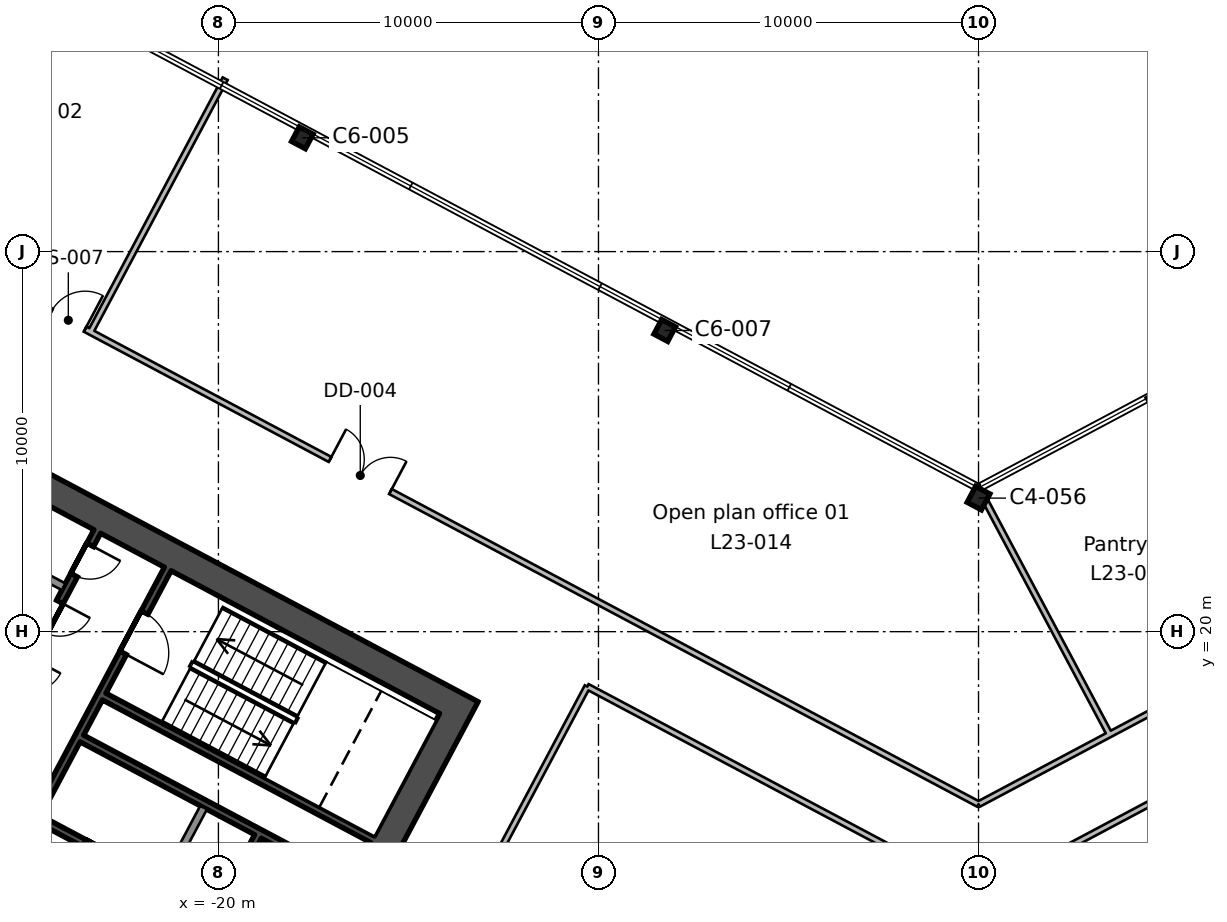
"""IFC4 building model, lengths in metres.
Left out: names, types, materials, properties, quantities, classifications, styles, units other than length and angle.
Written with IfcOpenShell. Run it as: python <this file> out.ifc"""

import sys

from ifc_helpers import new_model, si_unit, direction, frame, frame_2d, origin, origin_2d, place, context, subcontext, project, spatial, rectangle, i_section, extrude, element, fill, save


model = new_model("IFC4")
c1 = context("Model", 3, precision=1e-05, world=origin(), true_north=direction((0.0, 1.0)))
c2 = subcontext(c1, "Body", "Model", "MODEL_VIEW")
j1 = project(units=[si_unit("LENGTHUNIT", "METRE"), si_unit("PLANEANGLEUNIT", "RADIAN")], contexts=[c1])
p1 = place(None, origin())
s1 = spatial("IfcSite", under=j1, at=p1, CompositionType="ELEMENT")
p2 = place(p1, origin())
s2 = spatial("IfcBuilding", under=s1, at=p2, CompositionType="ELEMENT")
p3 = place(p2, frame((0.0, 0.0, 118.2)))
s3 = spatial("IfcBuildingStorey", under=s2, at=p3, CompositionType="ELEMENT", Elevation=118.2)
p4 = place(p3, frame((0.0, 23.514, 0.0), z_axis=(0.0, 0.0, 1.0), x_axis=(-0.882947592859, 0.469471562786, 0.0)))
e1 = element("IfcColumn", 1, at=p4, inside=s3, PredefinedType="COLUMN", context=c2, shape_type="SweptSolid", body=[
    extrude(i_section(OverallWidth=0.424, OverallDepth=0.475, WebThickness=0.048, FlangeThickness=0.077, FilletRadius=0.015, at=origin_2d()), origin(), (0.0, 0.0, 1.0), 4.0),
])
for number, where, z_axis, x_axis in (
    (2, (4.725, 26.047, 0.0), (0.0, 0.0, 1.0), (-0.883, -0.469, 0.0)),
    (3, (-8.257, 27.925, 0.0), (0.0, 0.0, 1.0), (-0.883, 0.469, 0.0)),
    (4, (-17.792, 32.995, 0.0), (0.0, 0.0, 1.0), (-0.883, 0.469, 0.0)),
):
    element("IfcColumn", number, at=place(p3, frame(where, z_axis=z_axis, x_axis=x_axis)), inside=s3, PredefinedType="COLUMN", context=c2, shape_type="SweptSolid", body=[
        extrude(i_section(OverallWidth=0.412, OverallDepth=0.434, WebThickness=0.036, FlangeThickness=0.057, FilletRadius=0.015, at=origin_2d()), origin(), (0.0, 0.0, 1.0), 4.0),
    ])
p5 = place(p3, frame((-13.498, 18.333, 0.0), z_axis=(0.0, 0.0, 1.0), x_axis=(-0.469469918705, -0.88294846703, 0.0)))
e5 = element("IfcWall", 5, at=p5, inside=s3, PredefinedType="SHEAR", context=c2, shape_type="SweptSolid", body=[
    extrude(rectangle(XDim=19.7, YDim=0.75, at=frame_2d((9.85, 0.0))), origin(), (0.0, 0.0, 1.0), 4.0),
])
p6 = place(p5, frame((6.85, 0.0, 0.0)))
e6 = element("IfcOpeningElement", 6, at=p6, cuts=e5, PredefinedType="OPENING", context=c2, shape_type="SweptSolid", body=[
    extrude(rectangle(XDim=2.4, YDim=2.4, at=frame_2d((1.2, 1.2))), frame((0.0, 0.385, 0.0), z_axis=(0.0, -1.0, 0.0), x_axis=(1.0, 0.0, 0.0)), (0.0, 0.0, 1.0), 0.77),
])
p7 = place(p3, frame((-14.005, 18.178, 0.0), z_axis=(0.0, 0.0, 1.0), x_axis=(-0.88295010195, 0.469466843842, 0.0)))
e7 = element("IfcWall", 7, at=p7, inside=s3, PredefinedType="SHEAR", context=c2, shape_type="SweptSolid", body=[
    extrude(rectangle(XDim=20.2, YDim=0.75, at=frame_2d((10.1, 0.0))), origin(), (0.0, 0.0, 1.0), 4.0),
])
p8 = place(p3, frame((-18.96, 14.611, 0.0), z_axis=(0.0, 0.0, 1.0), x_axis=(-0.4694473164, -0.882960484464, 0.0)))
e8 = element("IfcWall", 8, at=p8, inside=s3, PredefinedType="SHEAR", context=c2, shape_type="SweptSolid", body=[
    extrude(rectangle(XDim=2.2, YDim=0.2, at=frame_2d((1.1, 0.0))), origin(), (0.0, 0.0, 1.0), 4.0),
])
p9 = place(p3, frame((-20.39, 15.372, 0.0), z_axis=(0.0, 0.0, 1.0), x_axis=(-0.4694473164, -0.882960484464, 0.0)))
e9 = element("IfcWall", 9, at=p9, inside=s3, PredefinedType="SOLIDWALL", context=c2, shape_type="SweptSolid", body=[
    extrude(rectangle(XDim=2.2, YDim=0.2, at=frame_2d((1.1, 0.0))), origin(), (0.0, 0.0, 1.0), 4.0),
])
p10 = place(p3, frame((-21.333, 21.649, 0.0), z_axis=(0.0, 0.0, 1.0), x_axis=(-0.469494272526, -0.882935517501, 0.0)))
e10 = element("IfcWall", 10, at=p10, inside=s3, PredefinedType="SHEAR", context=c2, shape_type="SweptSolid", body=[
    extrude(rectangle(XDim=7.3, YDim=0.2, at=frame_2d((3.65, 0.0))), origin(), (0.0, 0.0, 1.0), 4.0),
])
p11 = place(p10, frame((1.3, 0.0, 0.0)))
e11 = element("IfcOpeningElement", 11, at=p11, cuts=e10, PredefinedType="OPENING", context=c2, shape_type="SweptSolid", body=[
    extrude(rectangle(XDim=1.2, YDim=2.1, at=frame_2d((0.6, 1.05))), frame((0.0, 0.11, 0.0), z_axis=(0.0, -1.0, 0.0), x_axis=(1.0, 0.0, 0.0)), (0.0, 0.0, 1.0), 0.22),
])
p12 = place(p3, frame((-23.188, 22.635, 0.0), z_axis=(0.0, 0.0, 1.0), x_axis=(-0.469454336211, -0.882956752176, 0.0)))
e12 = element("IfcWall", 12, at=p12, inside=s3, PredefinedType="SHEAR", context=c2, shape_type="SweptSolid", body=[
    extrude(rectangle(XDim=7.3, YDim=0.2, at=frame_2d((3.65, 0.0))), origin(), (0.0, 0.0, 1.0), 4.0),
])
p13 = place(p12, frame((0.4, 0.0, 0.0)))
e13 = element("IfcOpeningElement", 13, at=p13, cuts=e12, PredefinedType="OPENING", context=c2, shape_type="SweptSolid", body=[
    extrude(rectangle(XDim=0.9, YDim=2.1, at=frame_2d((0.45, 1.05))), frame((0.0, 0.11, 0.0), z_axis=(0.0, -1.0, 0.0), x_axis=(1.0, 0.0, 0.0)), (0.0, 0.0, 1.0), 0.22),
])
p14 = place(p12, frame((2.1, 0.0, 0.0)))
e14 = element("IfcOpeningElement", 14, at=p14, cuts=e12, PredefinedType="OPENING", context=c2, shape_type="SweptSolid", body=[
    extrude(rectangle(XDim=0.9, YDim=2.1, at=frame_2d((0.45, 1.05))), frame((0.0, 0.11, 0.0), z_axis=(0.0, -1.0, 0.0), x_axis=(1.0, 0.0, 0.0)), (0.0, 0.0, 1.0), 0.22),
])
p15 = place(p12, frame((3.75, 0.0, 0.0)))
e15 = element("IfcOpeningElement", 15, at=p15, cuts=e12, PredefinedType="OPENING", context=c2, shape_type="SweptSolid", body=[
    extrude(rectangle(XDim=0.9, YDim=2.1, at=frame_2d((0.45, 1.05))), frame((0.0, 0.11, 0.0), z_axis=(0.0, -1.0, 0.0), x_axis=(1.0, 0.0, 0.0)), (0.0, 0.0, 1.0), 0.22),
])
p16 = place(p3, frame((-24.074, 21.181, 0.0), z_axis=(0.0, 0.0, 1.0), x_axis=(-0.882953967957, 0.469459572775, 0.0)))
e16 = element("IfcWall", 16, at=p16, inside=s3, PredefinedType="SOLIDWALL", context=c2, shape_type="SweptSolid", body=[
    extrude(rectangle(XDim=5.2, YDim=0.2, at=frame_2d((2.6, 0.0))), origin(), (0.0, 0.0, 1.0), 4.0),
])
p17 = place(p3, frame((-15.942, 14.536, 0.0), z_axis=(0.0, 0.0, 1.0), x_axis=(-0.882946947542, 0.469472776449, 0.0)))
e17 = element("IfcWall", 17, at=p17, inside=s3, PredefinedType="SHEAR", context=c2, shape_type="SweptSolid", body=[
    extrude(rectangle(XDim=8.0, YDim=0.2, at=frame_2d((4.0, 0.0))), origin(), (0.0, 0.0, 1.0), 4.0),
])
p18 = place(p3, frame((-16.529, 13.432, 0.0), z_axis=(0.0, 0.0, 1.0), x_axis=(-0.88295287151, 0.469461634952, 0.0)))
e18 = element("IfcWall", 18, at=p18, inside=s3, PredefinedType="SHEAR", context=c2, shape_type="SweptSolid", body=[
    extrude(rectangle(XDim=8.0, YDim=0.2, at=frame_2d((4.0, 0.0))), origin(), (0.0, 0.0, 1.0), 4.0),
])
p19 = place(p3, frame((-20.04, 12.581, 0.0), z_axis=(0.0, 0.0, 1.0), x_axis=(-0.882942972946, 0.469480251476, 0.0)))
e19 = element("IfcWall", 19, at=p19, inside=s3, PredefinedType="SHEAR", context=c2, shape_type="SweptSolid", body=[
    extrude(rectangle(XDim=5.4, YDim=0.2, at=frame_2d((2.7, 0.0))), origin(), (0.0, 0.0, 1.0), 4.0),
])
p20 = place(p19, frame((0.36, 0.0, 0.0)))
e20 = element("IfcOpeningElement", 20, at=p20, cuts=e19, PredefinedType="OPENING", context=c2, shape_type="SweptSolid", body=[
    extrude(rectangle(XDim=0.9, YDim=2.1, at=frame_2d((0.45, 1.05))), frame((0.0, 0.11, 0.0), z_axis=(0.0, -1.0, 0.0), x_axis=(1.0, 0.0, 0.0)), (0.0, 0.0, 1.0), 0.22),
])
p21 = place(p19, frame((3.06, 0.0, 0.0)))
e21 = element("IfcOpeningElement", 21, at=p21, cuts=e19, PredefinedType="OPENING", context=c2, shape_type="SweptSolid", body=[
    extrude(rectangle(XDim=0.9, YDim=2.1, at=frame_2d((0.45, 1.05))), frame((0.0, 0.11, 0.0), z_axis=(0.0, -1.0, 0.0), x_axis=(1.0, 0.0, 0.0)), (0.0, 0.0, 1.0), 0.22),
])
p22 = place(p3, frame((-32.47, 32.724, 0.0), z_axis=(0.0, 0.0, 1.0), x_axis=(0.88295243426, -0.469462457321, 0.0)))
e22 = element("IfcWall", 22, at=p22, inside=s3, PredefinedType="PARTITIONING", context=c2, shape_type="SweptSolid", body=[
    extrude(rectangle(XDim=36.774, YDim=0.15, at=frame_2d((18.387, 0.0))), origin(), (0.0, 0.0, 1.0), 3.64),
])
p23 = place(p22, frame((17.45, 0.0, 0.0)))
e23 = element("IfcOpeningElement", 23, at=p23, cuts=e22, PredefinedType="OPENING", context=c2, shape_type="SweptSolid", body=[
    extrude(rectangle(XDim=1.8, YDim=2.1, at=frame_2d((0.9, 1.05))), frame((0.0, 0.085, 0.0), z_axis=(0.0, -1.0, 0.0), x_axis=(1.0, 0.0, 0.0)), (0.0, 0.0, 1.0), 0.17),
])
p24 = place(p22, frame((9.15, 0.0, 0.0)))
e24 = element("IfcOpeningElement", 24, at=p24, cuts=e22, PredefinedType="OPENING", context=c2, shape_type="SweptSolid", body=[
    extrude(rectangle(XDim=1.0, YDim=2.1, at=frame_2d((0.5, 1.05))), frame((0.0, 0.085, 0.0), z_axis=(0.0, -1.0, 0.0), x_axis=(1.0, 0.0, 0.0)), (0.0, 0.0, 1.0), 0.17),
])
p25 = place(p3, frame((0.0, 15.46, 0.0), z_axis=(0.0, 0.0, 1.0), x_axis=(0.882952116052, 0.469463055798, 0.0)))
e25 = element("IfcWall", 25, at=p25, inside=s3, PredefinedType="PARTITIONING", context=c2, shape_type="SweptSolid", body=[
    extrude(rectangle(XDim=18.96, YDim=0.15, at=frame_2d((9.48, 0.0))), origin(), (0.0, 0.0, 1.0), 3.64),
])
p26 = place(p25, frame((9.35, 0.0, 0.0)))
e26 = element("IfcOpeningElement", 26, at=p26, cuts=e25, PredefinedType="OPENING", context=c2, shape_type="SweptSolid", body=[
    extrude(rectangle(XDim=1.0, YDim=2.1, at=frame_2d((0.5, 1.05))), frame((0.0, 0.085, 0.0), z_axis=(0.0, -1.0, 0.0), x_axis=(1.0, 0.0, 0.0)), (0.0, 0.0, 1.0), 0.17),
])
p27 = place(p25, frame((7.7, 0.0, 0.0)))
e27 = element("IfcOpeningElement", 27, at=p27, cuts=e25, PredefinedType="OPENING", context=c2, shape_type="SweptSolid", body=[
    extrude(rectangle(XDim=1.0, YDim=2.1, at=frame_2d((0.5, 1.05))), frame((0.0, 0.085, 0.0), z_axis=(0.0, -1.0, 0.0), x_axis=(1.0, 0.0, 0.0)), (0.0, 0.0, 1.0), 0.17),
])
p28 = place(p3, frame((-19.822, 34.55, 0.0), z_axis=(0.0, 0.0, 1.0), x_axis=(-0.469426325488, -0.88297164447, 0.0)))
e28 = element("IfcWall", 28, at=p28, inside=s3, PredefinedType="PARTITIONING", context=c2, shape_type="SweptSolid", body=[
    extrude(rectangle(XDim=7.55, YDim=0.15, at=frame_2d((3.775, 0.0))), origin(), (0.0, 0.0, 1.0), 3.64),
])
p29 = place(p3, frame((0.191, 23.422, 0.0), z_axis=(0.0, 0.0, 1.0), x_axis=(0.46954180368, -0.882910241529, 0.0)))
e29 = element("IfcWall", 29, at=p29, inside=s3, PredefinedType="PARTITIONING", context=c2, shape_type="SweptSolid", body=[
    extrude(rectangle(XDim=6.941, YDim=0.15, at=frame_2d((3.47, 0.0))), origin(), (0.0, 0.0, 1.0), 3.64),
])
p30 = place(p3, frame((-21.139, -1.841, 0.0), z_axis=(0.0, 0.0, 1.0), x_axis=(0.46947923089, 0.882943515613, 0.0)))
e30 = element("IfcWall", 30, at=p30, inside=s3, PredefinedType="PARTITIONING", context=c2, shape_type="SweptSolid", body=[
    extrude(rectangle(XDim=23.1, YDim=0.15, at=frame_2d((11.55, 0.0))), origin(), (0.0, 0.0, 1.0), 3.64),
])
p31 = place(p30, frame((11.05, 0.0, 0.0)))
e31 = element("IfcOpeningElement", 31, at=p31, cuts=e30, PredefinedType="OPENING", context=c2, shape_type="SweptSolid", body=[
    extrude(rectangle(XDim=1.0, YDim=2.1, at=frame_2d((0.5, 1.05))), frame((0.0, 0.085, 0.0), z_axis=(0.0, -1.0, 0.0), x_axis=(1.0, 0.0, 0.0)), (0.0, 0.0, 1.0), 0.17),
])
p32 = place(p3, frame((-10.294, 18.555, 0.0), z_axis=(0.0, 0.0, 1.0), x_axis=(0.882931500577, -0.469501826714, 0.0)))
e32 = element("IfcWall", 32, at=p32, inside=s3, PredefinedType="PARTITIONING", context=c2, shape_type="SweptSolid", body=[
    extrude(rectangle(XDim=10.127, YDim=0.15, at=frame_2d((5.064, 0.0))), origin(), (0.0, 0.0, 1.0), 3.64),
])
p33 = place(p3, frame((6.762, 16.677, 0.0), z_axis=(0.0, 0.0, 1.0), x_axis=(-0.882917024124, -0.469529049699, 0.0)))
e33 = element("IfcWall", 33, at=p33, inside=s3, PredefinedType="PARTITIONING", context=c2, shape_type="SweptSolid", body=[
    extrude(rectangle(XDim=6.127, YDim=0.15, at=frame_2d((3.063, 0.0))), origin(), (0.0, 0.0, 1.0), 3.64),
])
p34 = place(p11, origin())
e34 = element("IfcDoor", 34, at=p34, inside=s3, OperationType="SINGLE_SWING_RIGHT", PredefinedType="DOOR", context=c2, shape_type="SweptSolid", body=[
    extrude(rectangle(XDim=1.2, YDim=2.1, at=frame_2d((0.6, 1.05))), frame((0.0, 0.025, 0.0), z_axis=(0.0, -1.0, 0.0), x_axis=(1.0, 0.0, 0.0)), (0.0, 0.0, 1.0), 0.05),
])
fill(e11, e34)
p35 = place(p21, origin())
e35 = element("IfcDoor", 35, at=p35, inside=s3, OperationType="SINGLE_SWING_LEFT", PredefinedType="DOOR", context=c2, shape_type="SweptSolid", body=[
    extrude(rectangle(XDim=0.9, YDim=2.1, at=frame_2d((0.45, 1.05))), frame((0.0, 0.025, 0.0), z_axis=(0.0, -1.0, 0.0), x_axis=(1.0, 0.0, 0.0)), (0.0, 0.0, 1.0), 0.05),
])
fill(e21, e35)
p36 = place(p13, origin())
e36 = element("IfcDoor", 36, at=p36, inside=s3, OperationType="SINGLE_SWING_LEFT", PredefinedType="DOOR", context=c2, shape_type="SweptSolid", body=[
    extrude(rectangle(XDim=0.9, YDim=2.1, at=frame_2d((0.45, 1.05))), frame((0.0, 0.025, 0.0), z_axis=(0.0, -1.0, 0.0), x_axis=(1.0, 0.0, 0.0)), (0.0, 0.0, 1.0), 0.05),
])
fill(e13, e36)
p37 = place(p14, origin())
e37 = element("IfcDoor", 37, at=p37, inside=s3, OperationType="SINGLE_SWING_LEFT", PredefinedType="DOOR", context=c2, shape_type="SweptSolid", body=[
    extrude(rectangle(XDim=0.9, YDim=2.1, at=frame_2d((0.45, 1.05))), frame((0.0, 0.025, 0.0), z_axis=(0.0, -1.0, 0.0), x_axis=(1.0, 0.0, 0.0)), (0.0, 0.0, 1.0), 0.05),
])
fill(e14, e37)
p38 = place(p23, origin())
e38 = element("IfcDoor", 38, at=p38, inside=s3, OperationType="DOUBLE_DOOR_SINGLE_SWING", PredefinedType="DOOR", context=c2, shape_type="SweptSolid", body=[
    extrude(rectangle(XDim=1.8, YDim=2.1, at=frame_2d((0.9, 1.05))), frame((0.0, 0.025, 0.0), z_axis=(0.0, -1.0, 0.0), x_axis=(1.0, 0.0, 0.0)), (0.0, 0.0, 1.0), 0.05),
])
fill(e23, e38)
p39 = place(p24, origin())
e39 = element("IfcDoor", 39, at=p39, inside=s3, OperationType="SINGLE_SWING_RIGHT", PredefinedType="DOOR", context=c2, shape_type="SweptSolid", body=[
    extrude(rectangle(XDim=1.0, YDim=2.1, at=frame_2d((0.5, 1.05))), frame((0.0, 0.025, 0.0), z_axis=(0.0, -1.0, 0.0), x_axis=(1.0, 0.0, 0.0)), (0.0, 0.0, 1.0), 0.05),
])
fill(e24, e39)
save(model, sys.argv[1])
